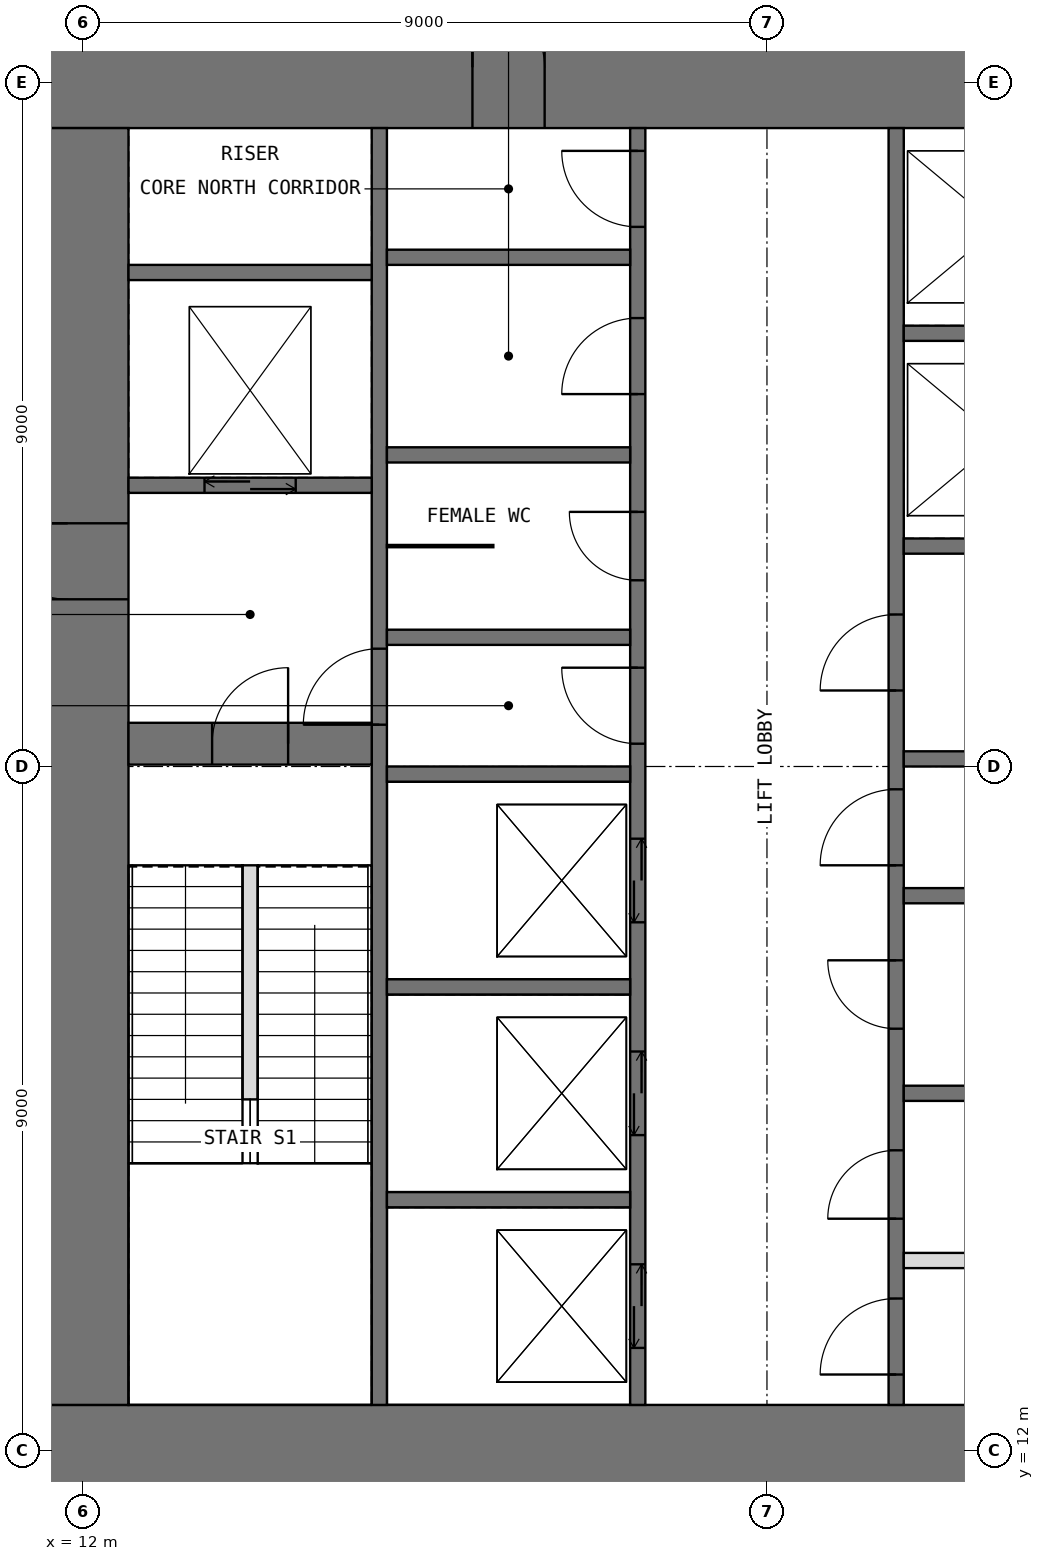
"""IFC4 building model, lengths in metres.
Left out: names, types, materials, properties, quantities, classifications, styles, units other than length and angle.
Written with IfcOpenShell. Run it as: python <this file> out.ifc"""

import sys

from ifc_helpers import new_model, si_unit, direction, frame, frame_2d, origin, place, context, subcontext, project, spatial, rectangle, extrude, element, fill, save


model = new_model("IFC4")
c1 = context("Model", 3, precision=1e-05, world=origin(), true_north=direction((0.0, 1.0)))
c2 = subcontext(c1, "Body", "Model", "MODEL_VIEW")
j1 = project(units=[si_unit("LENGTHUNIT", "METRE"), si_unit("PLANEANGLEUNIT", "RADIAN")], contexts=[c1])
p1 = place(None, origin())
s1 = spatial("IfcSite", under=j1, at=p1, CompositionType="ELEMENT")
p2 = place(p1, origin())
s2 = spatial("IfcBuilding", under=s1, at=p2, CompositionType="ELEMENT")
p3 = place(p2, frame((0.0, 0.0, 160.5)))
s3 = spatial("IfcBuildingStorey", under=s2, at=p3, CompositionType="ELEMENT", Elevation=160.5)
p4 = place(p3, frame((11.0, 11.8, -0.25), z_axis=(0.0, 0.0, 1.0), x_axis=(1.0, 0.0, 0.0)))
e1 = element("IfcWall", 1, at=p4, inside=s3, PredefinedType="SHEAR", context=c2, shape_type="SweptSolid", body=[
    extrude(rectangle(XDim=20.0, YDim=1.6, at=frame_2d((10.0, 0.0))), origin(), (0.0, 0.0, 1.0), 5.2),
])
p5 = place(p4, frame((12.925, 0.0, 0.25)))
e2 = element("IfcOpeningElement", 2, at=p5, cuts=e1, PredefinedType="OPENING", context=c2, shape_type="SweptSolid", body=[
    extrude(rectangle(XDim=0.95, YDim=2.4, at=frame_2d((0.475, 1.2))), frame((0.0, 0.81, 0.0), z_axis=(0.0, -1.0, 0.0), x_axis=(1.0, 0.0, 0.0)), (0.0, 0.0, 1.0), 1.62),
])
p6 = place(p3, frame((11.0, 30.2, -0.25), z_axis=(0.0, 0.0, 1.0), x_axis=(1.0, 0.0, 0.0)))
e3 = element("IfcWall", 3, at=p6, inside=s3, PredefinedType="SHEAR", context=c2, shape_type="SweptSolid", body=[
    extrude(rectangle(XDim=20.0, YDim=1.6, at=frame_2d((10.0, 0.0))), origin(), (0.0, 0.0, 1.0), 5.2),
])
p7 = place(p6, frame((6.125, 0.0, 0.25)))
e4 = element("IfcOpeningElement", 4, at=p7, cuts=e3, PredefinedType="OPENING", context=c2, shape_type="SweptSolid", body=[
    extrude(rectangle(XDim=0.95, YDim=2.4, at=frame_2d((0.475, 1.2))), frame((0.0, 0.81, 0.0), z_axis=(0.0, -1.0, 0.0), x_axis=(1.0, 0.0, 0.0)), (0.0, 0.0, 1.0), 1.62),
])
p8 = place(p3, frame((11.8, 12.6, -0.25), z_axis=(0.0, 0.0, 1.0), x_axis=(0.0, 1.0, 0.0)))
e5 = element("IfcWall", 5, at=p8, inside=s3, PredefinedType="SHEAR", context=c2, shape_type="SweptSolid", body=[
    extrude(rectangle(XDim=16.8, YDim=1.6, at=frame_2d((8.4, 0.0))), origin(), (0.0, 0.0, 1.0), 5.2),
])
p9 = place(p8, frame((10.6, 0.0, 0.25)))
e6 = element("IfcOpeningElement", 6, at=p9, cuts=e5, PredefinedType="OPENING", context=c2, shape_type="SweptSolid", body=[
    extrude(rectangle(XDim=1.0, YDim=2.2, at=frame_2d((0.5, 1.1))), frame((0.0, 0.81, 0.0), z_axis=(0.0, -1.0, 0.0), x_axis=(1.0, 0.0, 0.0)), (0.0, 0.0, 1.0), 1.62),
])
p10 = place(p3, frame((15.9, 12.6, -0.25), z_axis=(0.0, 0.0, 1.0), x_axis=(0.0, 1.0, 0.0)))
e7 = element("IfcWall", 7, at=p10, inside=s3, PredefinedType="SHEAR", context=c2, shape_type="SweptSolid", body=[
    extrude(rectangle(XDim=16.8, YDim=0.2, at=frame_2d((8.4, 0.0))), origin(), (0.0, 0.0, 1.0), 5.2),
])
p11 = place(p10, frame((8.95, 0.0, 0.25)))
e8 = element("IfcOpeningElement", 8, at=p11, cuts=e7, PredefinedType="OPENING", context=c2, shape_type="SweptSolid", body=[
    extrude(rectangle(XDim=1.0, YDim=2.2, at=frame_2d((0.5, 1.1))), frame((0.0, 0.11, 0.0), z_axis=(0.0, -1.0, 0.0), x_axis=(1.0, 0.0, 0.0)), (0.0, 0.0, 1.0), 0.22),
])
p12 = place(p3, frame((19.3, 12.6, -0.25), z_axis=(0.0, 0.0, 1.0), x_axis=(0.0, 1.0, 0.0)))
e9 = element("IfcWall", 9, at=p12, inside=s3, PredefinedType="SHEAR", context=c2, shape_type="SweptSolid", body=[
    extrude(rectangle(XDim=16.8, YDim=0.2, at=frame_2d((8.4, 0.0))), origin(), (0.0, 0.0, 1.0), 5.2),
])
p13 = place(p12, frame((8.7, 0.0, 0.25)))
e10 = element("IfcOpeningElement", 10, at=p13, cuts=e9, PredefinedType="OPENING", context=c2, shape_type="SweptSolid", body=[
    extrude(rectangle(XDim=1.0, YDim=2.2, at=frame_2d((0.5, 1.1))), frame((0.0, 0.11, 0.0), z_axis=(0.0, -1.0, 0.0), x_axis=(1.0, 0.0, 0.0)), (0.0, 0.0, 1.0), 0.22),
])
p14 = place(p12, frame((10.85, 0.0, 0.25)))
e11 = element("IfcOpeningElement", 11, at=p14, cuts=e9, PredefinedType="OPENING", context=c2, shape_type="SweptSolid", body=[
    extrude(rectangle(XDim=0.9, YDim=2.2, at=frame_2d((0.45, 1.1))), frame((0.0, 0.11, 0.0), z_axis=(0.0, -1.0, 0.0), x_axis=(1.0, 0.0, 0.0)), (0.0, 0.0, 1.0), 0.22),
])
p15 = place(p12, frame((13.3, 0.0, 0.25)))
e12 = element("IfcOpeningElement", 12, at=p15, cuts=e9, PredefinedType="OPENING", context=c2, shape_type="SweptSolid", body=[
    extrude(rectangle(XDim=1.0, YDim=2.2, at=frame_2d((0.5, 1.1))), frame((0.0, 0.11, 0.0), z_axis=(0.0, -1.0, 0.0), x_axis=(1.0, 0.0, 0.0)), (0.0, 0.0, 1.0), 0.22),
])
p16 = place(p12, frame((15.5, 0.0, 0.25)))
e13 = element("IfcOpeningElement", 13, at=p16, cuts=e9, PredefinedType="OPENING", context=c2, shape_type="SweptSolid", body=[
    extrude(rectangle(XDim=1.0, YDim=2.2, at=frame_2d((0.5, 1.1))), frame((0.0, 0.11, 0.0), z_axis=(0.0, -1.0, 0.0), x_axis=(1.0, 0.0, 0.0)), (0.0, 0.0, 1.0), 0.22),
])
p17 = place(p12, frame((0.75, 0.0, 0.25)))
e14 = element("IfcOpeningElement", 14, at=p17, cuts=e9, PredefinedType="OPENING", context=c2, shape_type="SweptSolid", body=[
    extrude(rectangle(XDim=1.1, YDim=2.2, at=frame_2d((0.55, 1.1))), frame((0.0, 0.11, 0.0), z_axis=(0.0, -1.0, 0.0), x_axis=(1.0, 0.0, 0.0)), (0.0, 0.0, 1.0), 0.22),
])
p18 = place(p12, frame((3.55, 0.0, 0.25)))
e15 = element("IfcOpeningElement", 15, at=p18, cuts=e9, PredefinedType="OPENING", context=c2, shape_type="SweptSolid", body=[
    extrude(rectangle(XDim=1.1, YDim=2.2, at=frame_2d((0.55, 1.1))), frame((0.0, 0.11, 0.0), z_axis=(0.0, -1.0, 0.0), x_axis=(1.0, 0.0, 0.0)), (0.0, 0.0, 1.0), 0.22),
])
p19 = place(p12, frame((6.35, 0.0, 0.25)))
e16 = element("IfcOpeningElement", 16, at=p19, cuts=e9, PredefinedType="OPENING", context=c2, shape_type="SweptSolid", body=[
    extrude(rectangle(XDim=1.1, YDim=2.2, at=frame_2d((0.55, 1.1))), frame((0.0, 0.11, 0.0), z_axis=(0.0, -1.0, 0.0), x_axis=(1.0, 0.0, 0.0)), (0.0, 0.0, 1.0), 0.22),
])
p20 = place(p3, frame((22.7, 12.6, -0.25), z_axis=(0.0, 0.0, 1.0), x_axis=(0.0, 1.0, 0.0)))
e17 = element("IfcWall", 17, at=p20, inside=s3, PredefinedType="SHEAR", context=c2, shape_type="SweptSolid", body=[
    extrude(rectangle(XDim=16.8, YDim=0.2, at=frame_2d((8.4, 0.0))), origin(), (0.0, 0.0, 1.0), 5.2),
])
p21 = place(p20, frame((0.4, 0.0, 0.25)))
e18 = element("IfcOpeningElement", 18, at=p21, cuts=e17, PredefinedType="OPENING", context=c2, shape_type="SweptSolid", body=[
    extrude(rectangle(XDim=1.0, YDim=2.2, at=frame_2d((0.5, 1.1))), frame((0.0, 0.11, 0.0), z_axis=(0.0, -1.0, 0.0), x_axis=(1.0, 0.0, 0.0)), (0.0, 0.0, 1.0), 0.22),
])
p22 = place(p20, frame((7.1, 0.0, 0.25)))
e19 = element("IfcOpeningElement", 19, at=p22, cuts=e17, PredefinedType="OPENING", context=c2, shape_type="SweptSolid", body=[
    extrude(rectangle(XDim=1.0, YDim=2.2, at=frame_2d((0.5, 1.1))), frame((0.0, 0.11, 0.0), z_axis=(0.0, -1.0, 0.0), x_axis=(1.0, 0.0, 0.0)), (0.0, 0.0, 1.0), 0.22),
])
p23 = place(p20, frame((2.45, 0.0, 0.25)))
e20 = element("IfcOpeningElement", 20, at=p23, cuts=e17, PredefinedType="OPENING", context=c2, shape_type="SweptSolid", body=[
    extrude(rectangle(XDim=0.9, YDim=2.2, at=frame_2d((0.45, 1.1))), frame((0.0, 0.11, 0.0), z_axis=(0.0, -1.0, 0.0), x_axis=(1.0, 0.0, 0.0)), (0.0, 0.0, 1.0), 0.22),
])
p24 = place(p20, frame((4.95, 0.0, 0.25)))
e21 = element("IfcOpeningElement", 21, at=p24, cuts=e17, PredefinedType="OPENING", context=c2, shape_type="SweptSolid", body=[
    extrude(rectangle(XDim=0.9, YDim=2.2, at=frame_2d((0.45, 1.1))), frame((0.0, 0.11, 0.0), z_axis=(0.0, -1.0, 0.0), x_axis=(1.0, 0.0, 0.0)), (0.0, 0.0, 1.0), 0.22),
])
p25 = place(p20, frame((9.4, 0.0, 0.25)))
e22 = element("IfcOpeningElement", 22, at=p25, cuts=e17, PredefinedType="OPENING", context=c2, shape_type="SweptSolid", body=[
    extrude(rectangle(XDim=1.0, YDim=2.2, at=frame_2d((0.5, 1.1))), frame((0.0, 0.11, 0.0), z_axis=(0.0, -1.0, 0.0), x_axis=(1.0, 0.0, 0.0)), (0.0, 0.0, 1.0), 0.22),
])
p26 = place(p3, frame((12.6, 21.3, -0.25), z_axis=(0.0, 0.0, 1.0), x_axis=(1.0, 0.0, 0.0)))
e23 = element("IfcWall", 23, at=p26, inside=s3, PredefinedType="SHEAR", context=c2, shape_type="SweptSolid", body=[
    extrude(rectangle(XDim=3.2, YDim=0.55, at=frame_2d((1.6, 0.0))), origin(), (0.0, 0.0, 1.0), 5.2),
])
p27 = place(p26, frame((1.1, 0.0, 0.25)))
e24 = element("IfcOpeningElement", 24, at=p27, cuts=e23, PredefinedType="OPENING", context=c2, shape_type="SweptSolid", body=[
    extrude(rectangle(XDim=1.0, YDim=2.2, at=frame_2d((0.5, 1.1))), frame((0.0, 0.285, 0.0), z_axis=(0.0, -1.0, 0.0), x_axis=(1.0, 0.0, 0.0)), (0.0, 0.0, 1.0), 0.57),
])
p28 = place(p3, frame((12.6, 24.7, -0.25), z_axis=(0.0, 0.0, 1.0), x_axis=(1.0, 0.0, 0.0)))
e25 = element("IfcWall", 25, at=p28, inside=s3, PredefinedType="SHEAR", context=c2, shape_type="SweptSolid", body=[
    extrude(rectangle(XDim=3.2, YDim=0.2, at=frame_2d((1.6, 0.0))), origin(), (0.0, 0.0, 1.0), 5.2),
])
p29 = place(p28, frame((1.0, 0.0, 0.25)))
e26 = element("IfcOpeningElement", 26, at=p29, cuts=e25, PredefinedType="OPENING", context=c2, shape_type="SweptSolid", body=[
    extrude(rectangle(XDim=1.2, YDim=2.2, at=frame_2d((0.6, 1.1))), frame((0.0, 0.11, 0.0), z_axis=(0.0, -1.0, 0.0), x_axis=(1.0, 0.0, 0.0)), (0.0, 0.0, 1.0), 0.22),
])
for number, where, z_axis, x_axis in (
    (27, (12.6, 27.5, -0.25), (0.0, 0.0, 1.0), (1.0, 0.0, 0.0)),
    (28, (16.0, 15.3, -0.25), (0.0, 0.0, 1.0), (1.0, 0.0, 0.0)),
    (29, (16.0, 18.1, -0.25), (0.0, 0.0, 1.0), (1.0, 0.0, 0.0)),
    (30, (16.0, 20.9, -0.25), (0.0, 0.0, 1.0), (1.0, 0.0, 0.0)),
    (31, (16.0, 22.7, -0.25), (0.0, 0.0, 1.0), (1.0, 0.0, 0.0)),
    (32, (16.0, 25.1, -0.25), (0.0, 0.0, 1.0), (1.0, 0.0, 0.0)),
    (33, (16.0, 27.7, -0.25), (0.0, 0.0, 1.0), (1.0, 0.0, 0.0)),
    (34, (22.8, 16.7, -0.25), (0.0, 0.0, 1.0), (1.0, 0.0, 0.0)),
    (35, (22.8, 19.3, -0.25), (0.0, 0.0, 1.0), (1.0, 0.0, 0.0)),
    (36, (22.8, 21.1, -0.25), (0.0, 0.0, 1.0), (1.0, 0.0, 0.0)),
    (37, (22.8, 23.9, -0.25), (0.0, 0.0, 1.0), (1.0, 0.0, 0.0)),
    (38, (22.8, 26.7, -0.25), (0.0, 0.0, 1.0), (1.0, 0.0, 0.0)),
):
    element("IfcWall", number, at=place(p3, frame(where, z_axis=z_axis, x_axis=x_axis)), inside=s3, PredefinedType="SHEAR", context=c2, shape_type="SweptSolid", body=[
        extrude(rectangle(XDim=3.2, YDim=0.2, at=frame_2d((1.6, 0.0))), origin(), (0.0, 0.0, 1.0), 5.2),
    ])
p30 = place(p3, frame((22.8, 14.5, 0.0), z_axis=(0.0, 0.0, 1.0), x_axis=(1.0, 0.0, 0.0)))
e39 = element("IfcWall", 39, at=p30, inside=s3, PredefinedType="PARTITIONING", context=c2, shape_type="SweptSolid", body=[
    extrude(rectangle(XDim=3.2, YDim=0.2, at=frame_2d((1.6, 0.0))), origin(), (0.0, 0.0, 1.0), 4.75),
])
p31 = place(p3, frame((16.0, 23.9, 0.0), z_axis=(0.0, 0.0, 1.0), x_axis=(1.0, 0.0, 0.0)))
e40 = element("IfcWall", 40, at=p31, inside=s3, PredefinedType="PARTITIONING", context=c2, shape_type="SweptSolid", body=[
    extrude(rectangle(XDim=1.4, YDim=0.03, at=frame_2d((0.7, 0.0))), origin(), (0.0, 0.0, 1.0), 4.75),
])
p32 = place(p3, frame((14.2, 16.62, 0.0), z_axis=(0.0, 0.0, 1.0), x_axis=(0.0, 1.0, 0.0)))
e41 = element("IfcWall", 41, at=p32, inside=s3, PredefinedType="PARTITIONING", context=c2, shape_type="SweptSolid", body=[
    extrude(rectangle(XDim=3.08, YDim=0.2, at=frame_2d((1.54, 0.0))), origin(), (0.0, 0.0, 1.0), 5.0),
])
p33 = place(p21, origin())
e42 = element("IfcDoor", 42, at=p33, inside=s3, OperationType="SINGLE_SWING_LEFT", PredefinedType="DOOR", context=c2, shape_type="SweptSolid", body=[
    extrude(rectangle(XDim=1.0, YDim=2.2, at=frame_2d((0.5, 1.1))), frame((0.0, 0.025, 0.0), z_axis=(0.0, -1.0, 0.0), x_axis=(1.0, 0.0, 0.0)), (0.0, 0.0, 1.0), 0.05),
])
fill(e18, e42)
p34 = place(p7, origin())
e43 = element("IfcDoor", 43, at=p34, inside=s3, OperationType="SINGLE_SWING_LEFT", PredefinedType="DOOR", context=c2, shape_type="SweptSolid", body=[
    extrude(rectangle(XDim=0.95, YDim=2.4, at=frame_2d((0.475, 1.2))), frame((0.0, 0.125, 0.0), z_axis=(0.0, -1.0, 0.0), x_axis=(1.0, 0.0, 0.0)), (0.0, 0.0, 1.0), 0.05),
])
fill(e4, e43)
p35 = place(p9, origin())
e44 = element("IfcDoor", 44, at=p35, inside=s3, OperationType="SINGLE_SWING_RIGHT", PredefinedType="DOOR", context=c2, shape_type="SweptSolid", body=[
    extrude(rectangle(XDim=1.0, YDim=2.2, at=frame_2d((0.5, 1.1))), frame((0.0, 0.025, 0.0), z_axis=(0.0, -1.0, 0.0), x_axis=(1.0, 0.0, 0.0)), (0.0, 0.0, 1.0), 0.05),
])
fill(e6, e44)
p36 = place(p27, origin())
e45 = element("IfcDoor", 45, at=p36, inside=s3, OperationType="SINGLE_SWING_RIGHT", PredefinedType="DOOR", context=c2, shape_type="SweptSolid", body=[
    extrude(rectangle(XDim=1.0, YDim=2.2, at=frame_2d((0.5, 1.1))), frame((0.0, 0.025, 0.0), z_axis=(0.0, -1.0, 0.0), x_axis=(1.0, 0.0, 0.0)), (0.0, 0.0, 1.0), 0.05),
])
fill(e24, e45)
p37 = place(p11, origin())
e46 = element("IfcDoor", 46, at=p37, inside=s3, OperationType="SINGLE_SWING_LEFT", PredefinedType="DOOR", context=c2, shape_type="SweptSolid", body=[
    extrude(rectangle(XDim=1.0, YDim=2.2, at=frame_2d((0.5, 1.1))), frame((0.0, 0.025, 0.0), z_axis=(0.0, -1.0, 0.0), x_axis=(1.0, 0.0, 0.0)), (0.0, 0.0, 1.0), 0.05),
])
fill(e8, e46)
p38 = place(p13, origin())
e47 = element("IfcDoor", 47, at=p38, inside=s3, OperationType="SINGLE_SWING_RIGHT", PredefinedType="DOOR", context=c2, shape_type="SweptSolid", body=[
    extrude(rectangle(XDim=1.0, YDim=2.2, at=frame_2d((0.5, 1.1))), frame((0.0, 0.025, 0.0), z_axis=(0.0, -1.0, 0.0), x_axis=(1.0, 0.0, 0.0)), (0.0, 0.0, 1.0), 0.05),
])
fill(e10, e47)
p39 = place(p22, origin())
e48 = element("IfcDoor", 48, at=p39, inside=s3, OperationType="SINGLE_SWING_LEFT", PredefinedType="DOOR", context=c2, shape_type="SweptSolid", body=[
    extrude(rectangle(XDim=1.0, YDim=2.2, at=frame_2d((0.5, 1.1))), frame((0.0, 0.025, 0.0), z_axis=(0.0, -1.0, 0.0), x_axis=(1.0, 0.0, 0.0)), (0.0, 0.0, 1.0), 0.05),
])
fill(e19, e48)
p40 = place(p14, origin())
e49 = element("IfcDoor", 49, at=p40, inside=s3, OperationType="SINGLE_SWING_RIGHT", PredefinedType="DOOR", context=c2, shape_type="SweptSolid", body=[
    extrude(rectangle(XDim=0.9, YDim=2.2, at=frame_2d((0.45, 1.1))), frame((0.0, 0.025, 0.0), z_axis=(0.0, -1.0, 0.0), x_axis=(1.0, 0.0, 0.0)), (0.0, 0.0, 1.0), 0.05),
])
fill(e11, e49)
p41 = place(p15, origin())
e50 = element("IfcDoor", 50, at=p41, inside=s3, OperationType="SINGLE_SWING_LEFT", PredefinedType="DOOR", context=c2, shape_type="SweptSolid", body=[
    extrude(rectangle(XDim=1.0, YDim=2.2, at=frame_2d((0.5, 1.1))), frame((0.0, 0.025, 0.0), z_axis=(0.0, -1.0, 0.0), x_axis=(1.0, 0.0, 0.0)), (0.0, 0.0, 1.0), 0.05),
])
fill(e12, e50)
p42 = place(p16, origin())
e51 = element("IfcDoor", 51, at=p42, inside=s3, OperationType="SINGLE_SWING_RIGHT", PredefinedType="DOOR", context=c2, shape_type="SweptSolid", body=[
    extrude(rectangle(XDim=1.0, YDim=2.2, at=frame_2d((0.5, 1.1))), frame((0.0, 0.025, 0.0), z_axis=(0.0, -1.0, 0.0), x_axis=(1.0, 0.0, 0.0)), (0.0, 0.0, 1.0), 0.05),
])
fill(e13, e51)
p43 = place(p23, origin())
e52 = element("IfcDoor", 52, at=p43, inside=s3, OperationType="SINGLE_SWING_LEFT", PredefinedType="DOOR", context=c2, shape_type="SweptSolid", body=[
    extrude(rectangle(XDim=0.9, YDim=2.2, at=frame_2d((0.45, 1.1))), frame((0.0, 0.025, 0.0), z_axis=(0.0, -1.0, 0.0), x_axis=(1.0, 0.0, 0.0)), (0.0, 0.0, 1.0), 0.05),
])
fill(e20, e52)
p44 = place(p24, origin())
e53 = element("IfcDoor", 53, at=p44, inside=s3, OperationType="SINGLE_SWING_RIGHT", PredefinedType="DOOR", context=c2, shape_type="SweptSolid", body=[
    extrude(rectangle(XDim=0.9, YDim=2.2, at=frame_2d((0.45, 1.1))), frame((0.0, 0.025, 0.0), z_axis=(0.0, -1.0, 0.0), x_axis=(1.0, 0.0, 0.0)), (0.0, 0.0, 1.0), 0.05),
])
fill(e21, e53)
p45 = place(p25, origin())
e54 = element("IfcDoor", 54, at=p45, inside=s3, OperationType="SINGLE_SWING_LEFT", PredefinedType="DOOR", context=c2, shape_type="SweptSolid", body=[
    extrude(rectangle(XDim=1.0, YDim=2.2, at=frame_2d((0.5, 1.1))), frame((0.0, 0.025, 0.0), z_axis=(0.0, -1.0, 0.0), x_axis=(1.0, 0.0, 0.0)), (0.0, 0.0, 1.0), 0.05),
])
fill(e22, e54)
p46 = place(p17, origin())
e55 = element("IfcDoor", 55, at=p46, inside=s3, OperationType="DOUBLE_DOOR_SLIDING", PredefinedType="DOOR", context=c2, shape_type="SweptSolid", body=[
    extrude(rectangle(XDim=1.1, YDim=2.2, at=frame_2d((0.55, 1.1))), frame((0.0, 0.025, 0.0), z_axis=(0.0, -1.0, 0.0), x_axis=(1.0, 0.0, 0.0)), (0.0, 0.0, 1.0), 0.05),
])
fill(e14, e55)
p47 = place(p18, origin())
e56 = element("IfcDoor", 56, at=p47, inside=s3, OperationType="DOUBLE_DOOR_SLIDING", PredefinedType="DOOR", context=c2, shape_type="SweptSolid", body=[
    extrude(rectangle(XDim=1.1, YDim=2.2, at=frame_2d((0.55, 1.1))), frame((0.0, 0.025, 0.0), z_axis=(0.0, -1.0, 0.0), x_axis=(1.0, 0.0, 0.0)), (0.0, 0.0, 1.0), 0.05),
])
fill(e15, e56)
p48 = place(p19, origin())
e57 = element("IfcDoor", 57, at=p48, inside=s3, OperationType="DOUBLE_DOOR_SLIDING", PredefinedType="DOOR", context=c2, shape_type="SweptSolid", body=[
    extrude(rectangle(XDim=1.1, YDim=2.2, at=frame_2d((0.55, 1.1))), frame((0.0, 0.025, 0.0), z_axis=(0.0, -1.0, 0.0), x_axis=(1.0, 0.0, 0.0)), (0.0, 0.0, 1.0), 0.05),
])
fill(e16, e57)
p49 = place(p29, origin())
e58 = element("IfcDoor", 58, at=p49, inside=s3, OperationType="DOUBLE_DOOR_SLIDING", PredefinedType="DOOR", context=c2, shape_type="SweptSolid", body=[
    extrude(rectangle(XDim=1.2, YDim=2.2, at=frame_2d((0.6, 1.1))), frame((0.0, 0.025, 0.0), z_axis=(0.0, -1.0, 0.0), x_axis=(1.0, 0.0, 0.0)), (0.0, 0.0, 1.0), 0.05),
])
fill(e26, e58)
save(model, sys.argv[1])
